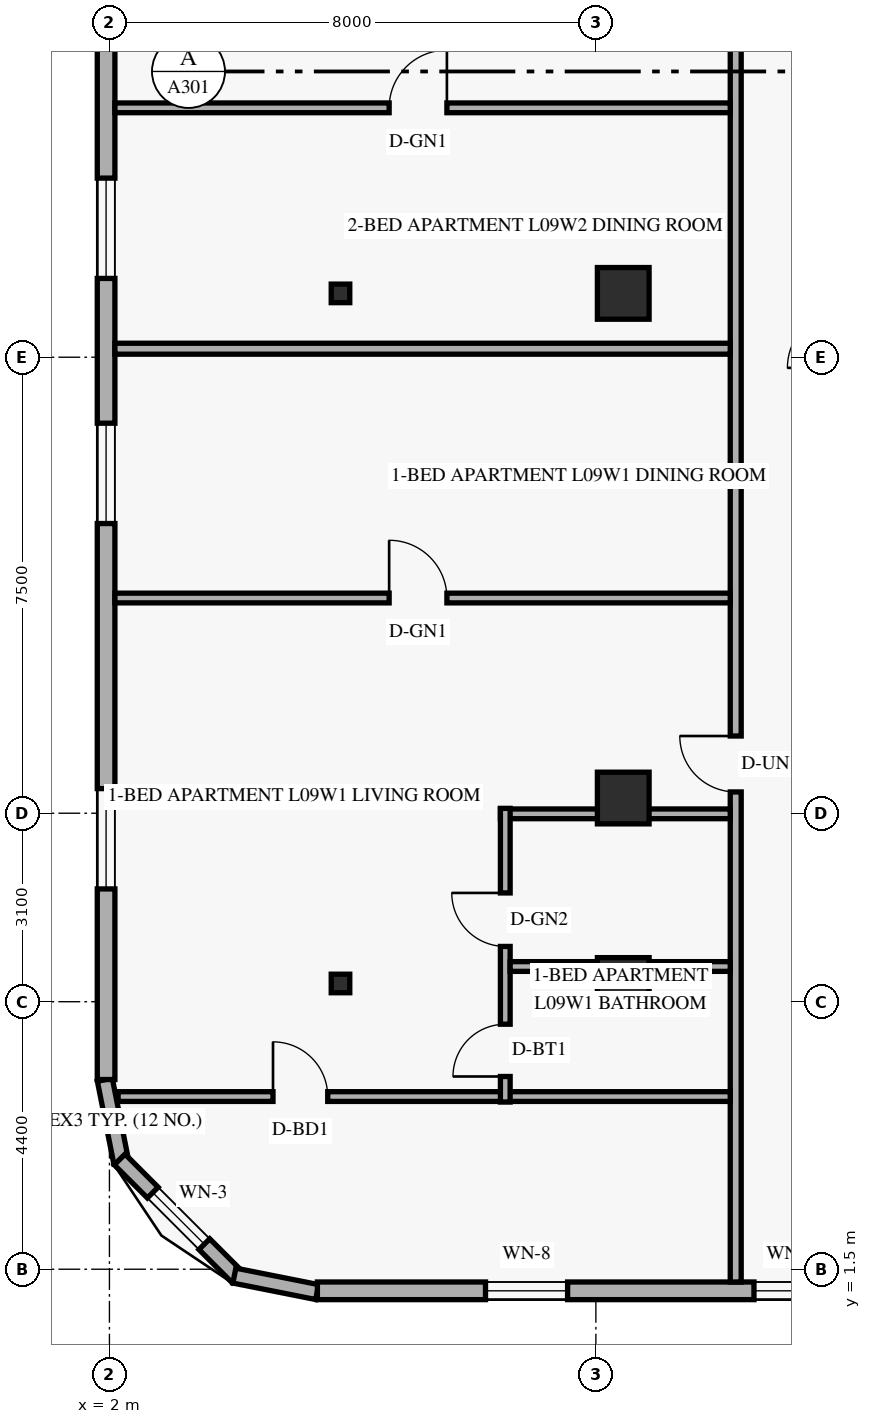
"""IFC4 building model, lengths in metres.
Left out: names, types, materials, properties, quantities, classifications, styles, units other than length and angle.
Written with IfcOpenShell. Run it as: python <this file> out.ifc"""

import sys

from ifc_helpers import new_model, si_unit, direction, frame, frame_2d, origin, origin_2d, place, context, subcontext, project, spatial, rectangle, hollow_rectangle, extrude, element, fill, save


model = new_model("IFC4")
c1 = context("Model", 3, precision=1e-05, world=origin(), true_north=direction((0.0, 1.0)))
c2 = subcontext(c1, "Body", "Model", "MODEL_VIEW")
j1 = project(units=[si_unit("LENGTHUNIT", "METRE"), si_unit("PLANEANGLEUNIT", "RADIAN")], contexts=[c1])
p1 = place(None, origin())
s1 = spatial("IfcSite", under=j1, at=p1, CompositionType="ELEMENT")
p2 = place(p1, origin())
s2 = spatial("IfcBuilding", under=s1, at=p2, CompositionType="ELEMENT")
p3 = place(p2, frame((0.0, 0.0, 38.4)))
s3 = spatial("IfcBuildingStorey", under=s2, at=p3, CompositionType="ELEMENT", Elevation=38.4)
for number, where, z_axis, x_axis in (
    (1, (5.8, 6.2, 0.0), (0.0, 0.0, 1.0), (1.0, 0.0, 0.0)),
    (2, (5.8, 9.25, 0.0), (0.0, 0.0, 1.0), (1.0, 0.0, 0.0)),
    (3, (5.8, 17.55, 0.0), (0.0, 0.0, 1.0), (1.0, 0.0, 0.0)),
):
    element("IfcColumn", number, at=place(p3, frame(where, z_axis=z_axis, x_axis=x_axis)), inside=s3, PredefinedType="COLUMN", context=c2, shape_type="SweptSolid", body=[
        extrude(hollow_rectangle(XDim=0.305, YDim=0.305, WallThickness=0.013, at=origin_2d()), origin(), (0.0, 0.0, 1.0), 3.6),
    ])
for number, where, z_axis, x_axis in (
    (4, (10.45, 6.2, 0.0), (0.0, 0.0, 1.0), (1.0, 0.0, 0.0)),
    (5, (10.45, 9.25, 0.0), (0.0, 0.0, 1.0), (1.0, 0.0, 0.0)),
    (6, (10.45, 17.55, 0.0), (0.0, 0.0, 1.0), (1.0, 0.0, 0.0)),
):
    element("IfcColumn", number, at=place(p3, frame(where, z_axis=z_axis, x_axis=x_axis)), inside=s3, PredefinedType="COLUMN", context=c2, shape_type="SweptSolid", body=[
        extrude(rectangle(XDim=0.85, YDim=0.85, at=origin_2d()), origin(), (0.0, 0.0, 1.0), 3.6),
    ])
p4 = place(p3, frame((1.924, 4.616, 0.0), z_axis=(0.0, 0.0, 1.0), x_axis=(0.19496651342, -0.980809899341, 0.0)))
e7 = element("IfcWall", 7, at=p4, inside=s3, PredefinedType="SOLIDWALL", context=c2, shape_type="SweptSolid", body=[
    extrude(rectangle(XDim=1.389, YDim=0.25, at=frame_2d((0.694, 0.0))), origin(), (0.0, 0.0, 1.0), 3.36),
])
p5 = place(p3, frame((2.168, 3.305, 0.0), z_axis=(0.0, 0.0, 1.0), x_axis=(0.707106781187, -0.707106781187, 0.0)))
e8 = element("IfcWall", 8, at=p5, inside=s3, PredefinedType="SOLIDWALL", context=c2, shape_type="SweptSolid", body=[
    extrude(rectangle(XDim=2.739, YDim=0.25, at=frame_2d((1.37, 0.0))), origin(), (0.0, 0.0, 1.0), 3.36),
])
p6 = place(p5, frame((0.77, 0.0, 0.85)))
e9 = element("IfcOpeningElement", 9, at=p6, cuts=e8, PredefinedType="OPENING", context=c2, shape_type="SweptSolid", body=[
    extrude(rectangle(XDim=1.2, YDim=1.5, at=frame_2d((0.6, 0.75))), frame((0.0, 0.135, 0.0), z_axis=(0.0, -1.0, 0.0), x_axis=(1.0, 0.0, 0.0)), (0.0, 0.0, 1.0), 0.27),
])
p7 = place(p3, frame((4.054, 1.395, 0.0), z_axis=(0.0, 0.0, 1.0), x_axis=(0.980809899341, -0.19496651342, 0.0)))
e10 = element("IfcWall", 10, at=p7, inside=s3, PredefinedType="SOLIDWALL", context=c2, shape_type="SweptSolid", body=[
    extrude(rectangle(XDim=1.389, YDim=0.25, at=frame_2d((0.694, 0.0))), origin(), (0.0, 0.0, 1.0), 3.36),
])
p8 = place(p3, frame((5.42, 1.145, 0.0), z_axis=(0.0, 0.0, 1.0), x_axis=(1.0, 0.0, 0.0)))
e11 = element("IfcWall", 11, at=p8, inside=s3, PredefinedType="SOLIDWALL", context=c2, shape_type="SweptSolid", body=[
    extrude(rectangle(XDim=39.56, YDim=0.29, at=frame_2d((19.78, 0.0))), origin(), (0.0, 0.0, 1.0), 3.36),
])
p9 = place(p8, frame((2.765, 0.0, 0.85)))
e12 = element("IfcOpeningElement", 12, at=p9, cuts=e11, PredefinedType="OPENING", context=c2, shape_type="SweptSolid", body=[
    extrude(rectangle(XDim=1.35, YDim=1.55, at=frame_2d((0.675, 0.775))), frame((0.0, 0.155, 0.0), z_axis=(0.0, -1.0, 0.0), x_axis=(1.0, 0.0, 0.0)), (0.0, 0.0, 1.0), 0.31),
])
p10 = place(p8, frame((7.18, 0.0, 0.85)))
e13 = element("IfcOpeningElement", 13, at=p10, cuts=e11, PredefinedType="OPENING", context=c2, shape_type="SweptSolid", body=[
    extrude(rectangle(XDim=1.2, YDim=1.5, at=frame_2d((0.6, 0.75))), frame((0.0, 0.155, 0.0), z_axis=(0.0, -1.0, 0.0), x_axis=(1.0, 0.0, 0.0)), (0.0, 0.0, 1.0), 0.31),
])
p11 = place(p8, frame((12.056, 0.0, 0.85)))
e14 = element("IfcOpeningElement", 14, at=p11, cuts=e11, PredefinedType="OPENING", context=c2, shape_type="SweptSolid", body=[
    extrude(rectangle(XDim=1.35, YDim=1.55, at=frame_2d((0.675, 0.775))), frame((0.0, 0.155, 0.0), z_axis=(0.0, -1.0, 0.0), x_axis=(1.0, 0.0, 0.0)), (0.0, 0.0, 1.0), 0.31),
])
p12 = place(p8, frame((18.665, 0.0, 0.85)))
e15 = element("IfcOpeningElement", 15, at=p12, cuts=e11, PredefinedType="OPENING", context=c2, shape_type="SweptSolid", body=[
    extrude(rectangle(XDim=1.35, YDim=1.55, at=frame_2d((0.675, 0.775))), frame((0.0, 0.155, 0.0), z_axis=(0.0, -1.0, 0.0), x_axis=(1.0, 0.0, 0.0)), (0.0, 0.0, 1.0), 0.31),
])
p13 = place(p8, frame((25.274, 0.0, 0.85)))
e16 = element("IfcOpeningElement", 16, at=p13, cuts=e11, PredefinedType="OPENING", context=c2, shape_type="SweptSolid", body=[
    extrude(rectangle(XDim=1.35, YDim=1.55, at=frame_2d((0.675, 0.775))), frame((0.0, 0.155, 0.0), z_axis=(0.0, -1.0, 0.0), x_axis=(1.0, 0.0, 0.0)), (0.0, 0.0, 1.0), 0.31),
])
p14 = place(p8, frame((30.39, 0.0, 0.85)))
e17 = element("IfcOpeningElement", 17, at=p14, cuts=e11, PredefinedType="OPENING", context=c2, shape_type="SweptSolid", body=[
    extrude(rectangle(XDim=1.35, YDim=1.55, at=frame_2d((0.675, 0.775))), frame((0.0, 0.155, 0.0), z_axis=(0.0, -1.0, 0.0), x_axis=(1.0, 0.0, 0.0)), (0.0, 0.0, 1.0), 0.31),
])
p15 = place(p8, frame((32.763, 0.0, 0.85)))
e18 = element("IfcOpeningElement", 18, at=p15, cuts=e11, PredefinedType="OPENING", context=c2, shape_type="SweptSolid", body=[
    extrude(rectangle(XDim=1.35, YDim=1.55, at=frame_2d((0.675, 0.775))), frame((0.0, 0.155, 0.0), z_axis=(0.0, -1.0, 0.0), x_axis=(1.0, 0.0, 0.0)), (0.0, 0.0, 1.0), 0.31),
])
p16 = place(p8, frame((36.478, 0.0, 0.85)))
e19 = element("IfcOpeningElement", 19, at=p16, cuts=e11, PredefinedType="OPENING", context=c2, shape_type="SweptSolid", body=[
    extrude(rectangle(XDim=1.35, YDim=1.55, at=frame_2d((0.675, 0.775))), frame((0.0, 0.155, 0.0), z_axis=(0.0, -1.0, 0.0), x_axis=(1.0, 0.0, 0.0)), (0.0, 0.0, 1.0), 0.31),
])
p17 = place(p3, frame((1.945, 43.38, 0.0), z_axis=(0.0, 0.0, 1.0), x_axis=(0.0, -1.0, 0.0)))
e20 = element("IfcWall", 20, at=p17, inside=s3, PredefinedType="SOLIDWALL", context=c2, shape_type="SweptSolid", body=[
    extrude(rectangle(XDim=38.76, YDim=0.29, at=frame_2d((19.38, 0.0))), origin(), (0.0, 0.0, 1.0), 3.36),
])
p18 = place(p17, frame((33.975, 0.0, 0.85)))
e21 = element("IfcOpeningElement", 21, at=p18, cuts=e20, PredefinedType="OPENING", context=c2, shape_type="SweptSolid", body=[
    extrude(rectangle(XDim=1.65, YDim=1.6, at=frame_2d((0.825, 0.8))), frame((0.0, 0.155, 0.0), z_axis=(0.0, -1.0, 0.0), x_axis=(1.0, 0.0, 0.0)), (0.0, 0.0, 1.0), 0.31),
])
p19 = place(p17, frame((27.965, 0.0, 0.85)))
e22 = element("IfcOpeningElement", 22, at=p19, cuts=e20, PredefinedType="OPENING", context=c2, shape_type="SweptSolid", body=[
    extrude(rectangle(XDim=1.65, YDim=1.6, at=frame_2d((0.825, 0.8))), frame((0.0, 0.155, 0.0), z_axis=(0.0, -1.0, 0.0), x_axis=(1.0, 0.0, 0.0)), (0.0, 0.0, 1.0), 0.31),
])
p20 = place(p17, frame((23.934, 0.0, 0.85)))
e23 = element("IfcOpeningElement", 23, at=p20, cuts=e20, PredefinedType="OPENING", context=c2, shape_type="SweptSolid", body=[
    extrude(rectangle(XDim=1.65, YDim=1.6, at=frame_2d((0.825, 0.8))), frame((0.0, 0.155, 0.0), z_axis=(0.0, -1.0, 0.0), x_axis=(1.0, 0.0, 0.0)), (0.0, 0.0, 1.0), 0.31),
])
p21 = place(p17, frame((18.109, 0.0, 0.85)))
e24 = element("IfcOpeningElement", 24, at=p21, cuts=e20, PredefinedType="OPENING", context=c2, shape_type="SweptSolid", body=[
    extrude(rectangle(XDim=1.65, YDim=1.6, at=frame_2d((0.825, 0.8))), frame((0.0, 0.155, 0.0), z_axis=(0.0, -1.0, 0.0), x_axis=(1.0, 0.0, 0.0)), (0.0, 0.0, 1.0), 0.31),
])
p22 = place(p17, frame((12.27, 0.0, 0.85)))
e25 = element("IfcOpeningElement", 25, at=p22, cuts=e20, PredefinedType="OPENING", context=c2, shape_type="SweptSolid", body=[
    extrude(rectangle(XDim=1.65, YDim=1.6, at=frame_2d((0.825, 0.8))), frame((0.0, 0.155, 0.0), z_axis=(0.0, -1.0, 0.0), x_axis=(1.0, 0.0, 0.0)), (0.0, 0.0, 1.0), 0.31),
])
p23 = place(p17, frame((7.33, 0.0, 0.85)))
e26 = element("IfcOpeningElement", 26, at=p23, cuts=e20, PredefinedType="OPENING", context=c2, shape_type="SweptSolid", body=[
    extrude(rectangle(XDim=1.65, YDim=1.6, at=frame_2d((0.825, 0.8))), frame((0.0, 0.155, 0.0), z_axis=(0.0, -1.0, 0.0), x_axis=(1.0, 0.0, 0.0)), (0.0, 0.0, 1.0), 0.31),
])
p24 = place(p17, frame((1.78, 0.0, 0.85)))
e27 = element("IfcOpeningElement", 27, at=p24, cuts=e20, PredefinedType="OPENING", context=c2, shape_type="SweptSolid", body=[
    extrude(rectangle(XDim=1.65, YDim=1.6, at=frame_2d((0.825, 0.8))), frame((0.0, 0.155, 0.0), z_axis=(0.0, -1.0, 0.0), x_axis=(1.0, 0.0, 0.0)), (0.0, 0.0, 1.0), 0.31),
])
p25 = place(p3, frame((12.3, 1.29, 0.0), z_axis=(0.0, 0.0, 1.0), x_axis=(0.0, 1.0, 0.0)))
e28 = element("IfcWall", 28, at=p25, inside=s3, PredefinedType="STANDARD", context=c2, shape_type="SweptSolid", body=[
    extrude(rectangle(XDim=45.42, YDim=0.18, at=frame_2d((22.71, 0.0))), origin(), (0.0, 0.0, 1.0), 2.649),
])
p26 = place(p25, frame((8.06, 0.0, 0.0)))
e29 = element("IfcOpeningElement", 29, at=p26, cuts=e28, PredefinedType="OPENING", context=c2, shape_type="SweptSolid", body=[
    extrude(rectangle(XDim=0.92, YDim=2.15, at=frame_2d((0.46, 1.075))), frame((0.0, 0.1, 0.0), z_axis=(0.0, -1.0, 0.0), x_axis=(1.0, 0.0, 0.0)), (0.0, 0.0, 1.0), 0.2),
])
p27 = place(p25, frame((21.021, 0.0, 0.0)))
e30 = element("IfcOpeningElement", 30, at=p27, cuts=e28, PredefinedType="OPENING", context=c2, shape_type="SweptSolid", body=[
    extrude(rectangle(XDim=0.92, YDim=2.15, at=frame_2d((0.46, 1.075))), frame((0.0, 0.1, 0.0), z_axis=(0.0, -1.0, 0.0), x_axis=(1.0, 0.0, 0.0)), (0.0, 0.0, 1.0), 0.2),
])
p28 = place(p25, frame((35.99, 0.0, 0.0)))
e31 = element("IfcOpeningElement", 31, at=p28, cuts=e28, PredefinedType="OPENING", context=c2, shape_type="SweptSolid", body=[
    extrude(rectangle(XDim=0.92, YDim=2.15, at=frame_2d((0.46, 1.075))), frame((0.0, 0.1, 0.0), z_axis=(0.0, -1.0, 0.0), x_axis=(1.0, 0.0, 0.0)), (0.0, 0.0, 1.0), 0.2),
])
p29 = place(p3, frame((2.142, 4.34, 0.0), z_axis=(0.0, 0.0, 1.0), x_axis=(1.0, 0.0, 0.0)))
e32 = element("IfcWall", 32, at=p29, inside=s3, PredefinedType="PARTITIONING", context=c2, shape_type="SweptSolid", body=[
    extrude(rectangle(XDim=10.068, YDim=0.16, at=frame_2d((5.034, 0.0))), origin(), (0.0, 0.0, 1.0), 3.36),
])
p30 = place(p29, frame((2.548, 0.0, 0.0)))
e33 = element("IfcOpeningElement", 33, at=p30, cuts=e32, PredefinedType="OPENING", context=c2, shape_type="SweptSolid", body=[
    extrude(rectangle(XDim=0.9, YDim=2.14, at=frame_2d((0.45, 1.07))), frame((0.0, 0.09, 0.0), z_axis=(0.0, -1.0, 0.0), x_axis=(1.0, 0.0, 0.0)), (0.0, 0.0, 1.0), 0.18),
])
p31 = place(p3, frame((8.43, 8.99, 0.0), z_axis=(0.0, 0.0, 1.0), x_axis=(1.0, 0.0, 0.0)))
e34 = element("IfcWall", 34, at=p31, inside=s3, PredefinedType="PLUMBINGWALL", context=c2, shape_type="SweptSolid", body=[
    extrude(rectangle(XDim=3.78, YDim=0.16, at=frame_2d((1.89, 0.0))), origin(), (0.0, 0.0, 1.0), 3.36),
])
p32 = place(p3, frame((8.51, 4.25, 0.0), z_axis=(0.0, 0.0, 1.0), x_axis=(0.0, 1.0, 0.0)))
e35 = element("IfcWall", 35, at=p32, inside=s3, PredefinedType="PLUMBINGWALL", context=c2, shape_type="SweptSolid", body=[
    extrude(rectangle(XDim=4.83, YDim=0.16, at=frame_2d((2.415, 0.0))), origin(), (0.0, 0.0, 1.0), 2.809),
])
p33 = place(p32, frame((0.42, 0.0, 0.0)))
e36 = element("IfcOpeningElement", 36, at=p33, cuts=e35, PredefinedType="OPENING", context=c2, shape_type="SweptSolid", body=[
    extrude(rectangle(XDim=0.86, YDim=2.12, at=frame_2d((0.43, 1.06))), frame((0.0, 0.09, 0.0), z_axis=(0.0, -1.0, 0.0), x_axis=(1.0, 0.0, 0.0)), (0.0, 0.0, 1.0), 0.18),
])
p34 = place(p32, frame((2.559, 0.0, 0.0)))
e37 = element("IfcOpeningElement", 37, at=p34, cuts=e35, PredefinedType="OPENING", context=c2, shape_type="SweptSolid", body=[
    extrude(rectangle(XDim=0.88, YDim=2.12, at=frame_2d((0.44, 1.06))), frame((0.0, 0.09, 0.0), z_axis=(0.0, -1.0, 0.0), x_axis=(1.0, 0.0, 0.0)), (0.0, 0.0, 1.0), 0.18),
])
p35 = place(p3, frame((8.59, 6.479, 0.0), z_axis=(0.0, 0.0, 1.0), x_axis=(1.0, 0.0, 0.0)))
e38 = element("IfcWall", 38, at=p35, inside=s3, PredefinedType="PLUMBINGWALL", context=c2, shape_type="SweptSolid", body=[
    extrude(rectangle(XDim=3.62, YDim=0.16, at=frame_2d((1.81, 0.0))), origin(), (0.0, 0.0, 1.0), 3.36),
])
p36 = place(p3, frame((2.09, 12.54, 0.0), z_axis=(0.0, 0.0, 1.0), x_axis=(1.0, 0.0, 0.0)))
e39 = element("IfcWall", 39, at=p36, inside=s3, PredefinedType="PARTITIONING", context=c2, shape_type="SweptSolid", body=[
    extrude(rectangle(XDim=10.12, YDim=0.16, at=frame_2d((5.06, 0.0))), origin(), (0.0, 0.0, 1.0), 2.649),
])
p37 = place(p36, frame((4.51, 0.0, 0.0)))
e40 = element("IfcOpeningElement", 40, at=p37, cuts=e39, PredefinedType="OPENING", context=c2, shape_type="SweptSolid", body=[
    extrude(rectangle(XDim=0.95, YDim=2.15, at=frame_2d((0.475, 1.075))), frame((0.0, 0.09, 0.0), z_axis=(0.0, -1.0, 0.0), x_axis=(1.0, 0.0, 0.0)), (0.0, 0.0, 1.0), 0.18),
])
p38 = place(p3, frame((2.09, 16.64, 0.0), z_axis=(0.0, 0.0, 1.0), x_axis=(1.0, 0.0, 0.0)))
e41 = element("IfcWall", 41, at=p38, inside=s3, PredefinedType="PARTITIONING", context=c2, shape_type="SweptSolid", body=[
    extrude(rectangle(XDim=10.12, YDim=0.18, at=frame_2d((5.06, 0.0))), origin(), (0.0, 0.0, 1.0), 2.649),
])
p39 = place(p3, frame((2.09, 20.602, 0.0), z_axis=(0.0, 0.0, 1.0), x_axis=(1.0, 0.0, 0.0)))
e42 = element("IfcWall", 42, at=p39, inside=s3, PredefinedType="PARTITIONING", context=c2, shape_type="SweptSolid", body=[
    extrude(rectangle(XDim=10.12, YDim=0.16, at=frame_2d((5.06, 0.0))), origin(), (0.0, 0.0, 1.0), 2.649),
])
p40 = place(p39, frame((4.51, 0.0, 0.0)))
e43 = element("IfcOpeningElement", 43, at=p40, cuts=e42, PredefinedType="OPENING", context=c2, shape_type="SweptSolid", body=[
    extrude(rectangle(XDim=0.95, YDim=2.15, at=frame_2d((0.475, 1.075))), frame((0.0, 0.09, 0.0), z_axis=(0.0, -1.0, 0.0), x_axis=(1.0, 0.0, 0.0)), (0.0, 0.0, 1.0), 0.18),
])
p41 = place(p6, origin())
e44 = element("IfcWindow", 44, at=p41, inside=s3, PartitioningType="SINGLE_PANEL", PredefinedType="WINDOW", context=c2, shape_type="SweptSolid", body=[
    extrude(rectangle(XDim=1.2, YDim=1.5, at=frame_2d((0.6, 0.75))), frame((0.0, 0.03, 0.0), z_axis=(0.0, -1.0, 0.0), x_axis=(1.0, 0.0, 0.0)), (0.0, 0.0, 1.0), 0.06),
])
fill(e9, e44)
p42 = place(p9, origin())
e45 = element("IfcWindow", 45, at=p42, inside=s3, PartitioningType="SINGLE_PANEL", PredefinedType="WINDOW", context=c2, shape_type="SweptSolid", body=[
    extrude(rectangle(XDim=1.35, YDim=1.55, at=frame_2d((0.675, 0.775))), frame((0.0, 0.03, 0.0), z_axis=(0.0, -1.0, 0.0), x_axis=(1.0, 0.0, 0.0)), (0.0, 0.0, 1.0), 0.06),
])
fill(e12, e45)
p43 = place(p10, origin())
e46 = element("IfcWindow", 46, at=p43, inside=s3, PartitioningType="SINGLE_PANEL", PredefinedType="WINDOW", context=c2, shape_type="SweptSolid", body=[
    extrude(rectangle(XDim=1.2, YDim=1.5, at=frame_2d((0.6, 0.75))), frame((0.0, 0.03, 0.0), z_axis=(0.0, -1.0, 0.0), x_axis=(1.0, 0.0, 0.0)), (0.0, 0.0, 1.0), 0.06),
])
fill(e13, e46)
p44 = place(p18, origin())
e47 = element("IfcWindow", 47, at=p44, inside=s3, PartitioningType="SINGLE_PANEL", PredefinedType="WINDOW", context=c2, shape_type="SweptSolid", body=[
    extrude(rectangle(XDim=1.65, YDim=1.6, at=frame_2d((0.825, 0.8))), frame((0.0, 0.03, 0.0), z_axis=(0.0, -1.0, 0.0), x_axis=(1.0, 0.0, 0.0)), (0.0, 0.0, 1.0), 0.06),
])
fill(e21, e47)
p45 = place(p19, origin())
e48 = element("IfcWindow", 48, at=p45, inside=s3, PartitioningType="SINGLE_PANEL", PredefinedType="WINDOW", context=c2, shape_type="SweptSolid", body=[
    extrude(rectangle(XDim=1.65, YDim=1.6, at=frame_2d((0.825, 0.8))), frame((0.0, 0.03, 0.0), z_axis=(0.0, -1.0, 0.0), x_axis=(1.0, 0.0, 0.0)), (0.0, 0.0, 1.0), 0.06),
])
fill(e22, e48)
p46 = place(p20, origin())
e49 = element("IfcWindow", 49, at=p46, inside=s3, PartitioningType="SINGLE_PANEL", PredefinedType="WINDOW", context=c2, shape_type="SweptSolid", body=[
    extrude(rectangle(XDim=1.65, YDim=1.6, at=frame_2d((0.825, 0.8))), frame((0.0, 0.03, 0.0), z_axis=(0.0, -1.0, 0.0), x_axis=(1.0, 0.0, 0.0)), (0.0, 0.0, 1.0), 0.06),
])
fill(e23, e49)
p47 = place(p37, origin())
e50 = element("IfcDoor", 50, at=p47, inside=s3, OperationType="SINGLE_SWING_LEFT", PredefinedType="DOOR", context=c2, shape_type="SweptSolid", body=[
    extrude(rectangle(XDim=0.95, YDim=2.15, at=frame_2d((0.475, 1.075))), frame((0.0, 0.025, 0.0), z_axis=(0.0, -1.0, 0.0), x_axis=(1.0, 0.0, 0.0)), (0.0, 0.0, 1.0), 0.05),
])
fill(e40, e50)
p48 = place(p26, origin())
e51 = element("IfcDoor", 51, at=p48, inside=s3, OperationType="SINGLE_SWING_RIGHT", PredefinedType="DOOR", context=c2, shape_type="SweptSolid", body=[
    extrude(rectangle(XDim=0.92, YDim=2.15, at=frame_2d((0.46, 1.075))), frame((0.0, 0.025, 0.0), z_axis=(0.0, -1.0, 0.0), x_axis=(1.0, 0.0, 0.0)), (0.0, 0.0, 1.0), 0.05),
])
fill(e29, e51)
p49 = place(p33, origin())
e52 = element("IfcDoor", 52, at=p49, inside=s3, OperationType="SINGLE_SWING_LEFT", PredefinedType="DOOR", context=c2, shape_type="SweptSolid", body=[
    extrude(rectangle(XDim=0.86, YDim=2.12, at=frame_2d((0.43, 1.06))), frame((0.0, 0.025, 0.0), z_axis=(0.0, -1.0, 0.0), x_axis=(1.0, 0.0, 0.0)), (0.0, 0.0, 1.0), 0.05),
])
fill(e36, e52)
p50 = place(p34, origin())
e53 = element("IfcDoor", 53, at=p50, inside=s3, OperationType="SINGLE_SWING_RIGHT", PredefinedType="DOOR", context=c2, shape_type="SweptSolid", body=[
    extrude(rectangle(XDim=0.88, YDim=2.12, at=frame_2d((0.44, 1.06))), frame((0.0, 0.025, 0.0), z_axis=(0.0, -1.0, 0.0), x_axis=(1.0, 0.0, 0.0)), (0.0, 0.0, 1.0), 0.05),
])
fill(e37, e53)
p51 = place(p30, origin())
e54 = element("IfcDoor", 54, at=p51, inside=s3, OperationType="SINGLE_SWING_LEFT", PredefinedType="DOOR", context=c2, shape_type="SweptSolid", body=[
    extrude(rectangle(XDim=0.9, YDim=2.14, at=frame_2d((0.45, 1.07))), frame((0.0, 0.025, 0.0), z_axis=(0.0, -1.0, 0.0), x_axis=(1.0, 0.0, 0.0)), (0.0, 0.0, 1.0), 0.05),
])
fill(e33, e54)
p52 = place(p40, origin())
e55 = element("IfcDoor", 55, at=p52, inside=s3, OperationType="SINGLE_SWING_RIGHT", PredefinedType="DOOR", context=c2, shape_type="SweptSolid", body=[
    extrude(rectangle(XDim=0.95, YDim=2.15, at=frame_2d((0.475, 1.075))), frame((0.0, 0.025, 0.0), z_axis=(0.0, -1.0, 0.0), x_axis=(1.0, 0.0, 0.0)), (0.0, 0.0, 1.0), 0.05),
])
fill(e43, e55)
save(model, sys.argv[1])
